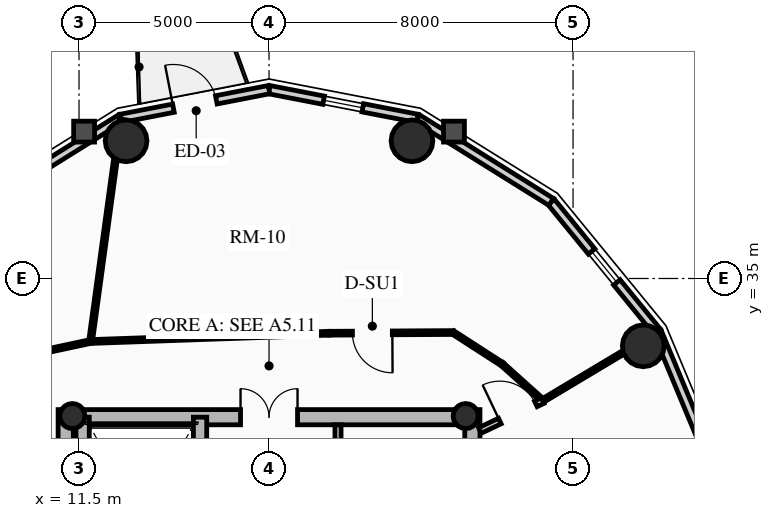
"""IFC4 building model, lengths in metres.
Left out: names, types, materials, properties, quantities, classifications, styles, units other than length and angle.
Written with IfcOpenShell. Run it as: python <this file> out.ifc"""

import sys

from ifc_helpers import new_model, si_unit, direction, frame, frame_2d, origin, origin_2d, place, context, subcontext, project, spatial, rectangle, circle, hollow_circle, extrude, source, transform, mapped, element, fill, save


model = new_model("IFC4")
c1 = context("Model", 3, precision=1e-05, world=origin(), true_north=direction((0.0, 1.0)))
c2 = subcontext(c1, "Body", "Model", "MODEL_VIEW")
j1 = project(units=[si_unit("LENGTHUNIT", "METRE"), si_unit("PLANEANGLEUNIT", "RADIAN")], contexts=[c1])
p1 = place(None, origin())
s1 = spatial("IfcSite", under=j1, at=p1, CompositionType="ELEMENT")
p2 = place(p1, origin())
s2 = spatial("IfcBuilding", under=s1, at=p2, CompositionType="ELEMENT")
p3 = place(p2, frame((0.0, 0.0, 199.57)))
s3 = spatial("IfcBuildingStorey", under=s2, at=p3, CompositionType="ELEMENT", Elevation=199.57)
for number, where, z_axis, x_axis in (
    (1, (11.15, 17.45, 0.0), (0.0, 0.0, 1.0), (0.0, 1.0, 0.0)),
    (2, (21.85, 17.45, 0.0), (0.0, 0.0, 1.0), (0.0, 1.0, 0.0)),
):
    element("IfcWall", number, at=place(p3, frame(where, z_axis=z_axis, x_axis=x_axis)), inside=s3, PredefinedType="SHEAR", context=c2, shape_type="SweptSolid", body=[
        extrude(rectangle(XDim=14.1, YDim=0.4, at=frame_2d((7.05, 0.0))), origin(), (0.0, 0.0, 1.0), 2.91),
    ])
p4 = place(p3, frame((11.15, 31.35, 0.0), z_axis=(0.0, 0.0, 1.0), x_axis=(1.0, 0.0, 0.0)))
e3 = element("IfcWall", 3, at=p4, inside=s3, PredefinedType="SHEAR", context=c2, shape_type="SweptSolid", body=[
    extrude(rectangle(XDim=10.7, YDim=0.4, at=frame_2d((5.35, 0.0))), origin(), (0.0, 0.0, 1.0), 2.91),
])
m1 = source(origin(), c2, "Body", "SweptSolid", [
    extrude(rectangle(XDim=1.5, YDim=2.02, at=frame_2d((0.75, 1.01))), frame((0.0, 0.21, 0.0), z_axis=(0.0, -1.0, 0.0), x_axis=(1.0, 0.0, 0.0)), (0.0, 0.0, 1.0), 0.42),
])
p5 = place(p4, frame((4.6, 0.0, 0.0)))
e4 = element("IfcOpeningElement", 4, at=p5, cuts=e3, PredefinedType="OPENING", context=c2, shape_type="MappedRepresentation", body=[
    mapped(m1, transform((0.0, 0.0, 0.0), x_axis=(1.0, 0.0, 0.0), y_axis=(0.0, 1.0, 0.0), z_axis=(0.0, 0.0, 1.0), scale=1.0)),
])
p6 = place(p3, frame((14.685, 17.65, 0.0), z_axis=(0.0, 0.0, 1.0), x_axis=(0.0, 1.0, 0.0)))
e5 = element("IfcWall", 5, at=p6, inside=s3, PredefinedType="SHEAR", context=c2, shape_type="SweptSolid", body=[
    extrude(rectangle(XDim=13.7, YDim=0.35, at=frame_2d((6.85, 0.0))), origin(), (0.0, 0.0, 1.0), 2.91),
])
m2 = source(origin(), c2, "Body", "SweptSolid", [
    extrude(rectangle(XDim=1.1, YDim=2.015, at=frame_2d((0.55, 1.007))), frame((0.0, 0.185, 0.0), z_axis=(0.0, -1.0, 0.0), x_axis=(1.0, 0.0, 0.0)), (0.0, 0.0, 1.0), 0.37),
])
p7 = place(p6, frame((4.85, 0.0, 0.0)))
e6 = element("IfcOpeningElement", 6, at=p7, cuts=e5, PredefinedType="OPENING", context=c2, shape_type="MappedRepresentation", body=[
    mapped(m2, transform((0.0, 0.0, 0.0), x_axis=(1.0, 0.0, 0.0), y_axis=(0.0, 1.0, 0.0), z_axis=(0.0, 0.0, 1.0), scale=1.0)),
])
p8 = place(p6, frame((0.625, 0.0, 0.0)))
e7 = element("IfcOpeningElement", 7, at=p8, cuts=e5, PredefinedType="OPENING", context=c2, shape_type="MappedRepresentation", body=[
    mapped(m2, transform((0.0, 0.0, 0.0), x_axis=(1.0, 0.0, 0.0), y_axis=(0.0, 1.0, 0.0), z_axis=(0.0, 0.0, 1.0), scale=1.0)),
])
p9 = place(p6, frame((2.625, 0.0, 0.0)))
e8 = element("IfcOpeningElement", 8, at=p9, cuts=e5, PredefinedType="OPENING", context=c2, shape_type="MappedRepresentation", body=[
    mapped(m2, transform((0.0, 0.0, 0.0), x_axis=(1.0, 0.0, 0.0), y_axis=(0.0, 1.0, 0.0), z_axis=(0.0, 0.0, 1.0), scale=1.0)),
])
m3 = source(origin(), c2, "Body", "SweptSolid", [
    extrude(rectangle(XDim=1.15, YDim=2.02, at=frame_2d((0.575, 1.01))), frame((0.0, 0.185, 0.0), z_axis=(0.0, -1.0, 0.0), x_axis=(1.0, 0.0, 0.0)), (0.0, 0.0, 1.0), 0.37),
])
p10 = place(p6, frame((7.27, 0.0, 0.0)))
e9 = element("IfcOpeningElement", 9, at=p10, cuts=e5, PredefinedType="OPENING", context=c2, shape_type="MappedRepresentation", body=[
    mapped(m3, transform((0.0, 0.0, 0.0), x_axis=(1.0, 0.0, 0.0), y_axis=(0.0, 1.0, 0.0), z_axis=(0.0, 0.0, 1.0), scale=1.0)),
])
p11 = place(p3, frame((11.595, 24.655, 0.0), z_axis=(0.0, 0.0, 1.0), x_axis=(0.0, 1.0, 0.0)))
e10 = element("IfcWall", 10, at=p11, inside=s3, PredefinedType="SHEAR", context=c2, shape_type="SweptSolid", body=[
    extrude(rectangle(XDim=6.695, YDim=0.35, at=frame_2d((3.348, 0.0))), origin(), (0.0, 0.0, 1.0), 2.91),
])
for number, where, z_axis, x_axis in (
    (11, (11.325, 31.38, 0.0), (0.0, 0.0, 1.0), (1.0, 0.0, 0.0)),
    (12, (21.675, 31.38, 0.0), (0.0, 0.0, 1.0), (1.0, 0.0, 0.0)),
):
    element("IfcColumn", number, at=place(p3, frame(where, z_axis=z_axis, x_axis=x_axis)), inside=s3, PredefinedType="COLUMN", context=c2, shape_type="SweptSolid", body=[
        extrude(hollow_circle(Radius=0.33, WallThickness=0.025, at=origin_2d()), origin(), (0.0, 0.0, 1.0), 2.91),
    ])
for number, where, z_axis, x_axis in (
    (13, (26.347, 33.229, 0.0), (0.0, 0.0, 1.0), (1.0, 0.0, 0.0)),
    (14, (20.261, 38.623, 0.0), (0.0, 0.0, 1.0), (1.0, 0.0, 0.0)),
    (15, (12.739, 38.623, 0.0), (0.0, 0.0, 1.0), (1.0, 0.0, 0.0)),
):
    element("IfcColumn", number, at=place(p3, frame(where, z_axis=z_axis, x_axis=x_axis)), inside=s3, PredefinedType="USERDEFINED", context=c2, shape_type="SweptSolid", body=[
        extrude(circle(Radius=0.55, at=origin_2d()), origin(), (0.0, 0.0, 1.0), 2.91),
    ])
p12 = place(p3, frame((26.718, 33.593, 0.0), z_axis=(0.0, 0.0, 1.0), x_axis=(0.384036305194, -0.923317993052, 0.0)))
e16 = element("IfcWall", 16, at=p12, inside=s3, PredefinedType="SOLIDWALL", context=c2, shape_type="SweptSolid", body=[
    extrude(rectangle(XDim=4.671, YDim=0.22, at=frame_2d((2.335, 0.0))), origin(), (0.0, 0.0, 1.0), 2.322),
])
p13 = place(p3, frame((23.924, 37.015, 0.0), z_axis=(0.0, 0.0, 1.0), x_axis=(0.632467166636, -0.774587169483, 0.0)))
e17 = element("IfcWall", 17, at=p13, inside=s3, PredefinedType="SOLIDWALL", context=c2, shape_type="SweptSolid", body=[
    extrude(rectangle(XDim=4.418, YDim=0.22, at=frame_2d((2.209, 0.0))), origin(), (0.0, 0.0, 1.0), 2.322),
])
m4 = source(origin(), c2, "Body", "SweptSolid", [
    extrude(rectangle(XDim=1.05, YDim=1.3, at=frame_2d((0.525, 0.65))), frame((0.0, 0.12, 0.0), z_axis=(0.0, -1.0, 0.0), x_axis=(1.0, 0.0, 0.0)), (0.0, 0.0, 1.0), 0.24),
])
p14 = place(p13, frame((1.684, 0.0, 0.65)))
e18 = element("IfcOpeningElement", 18, at=p14, cuts=e17, PredefinedType="OPENING", context=c2, shape_type="MappedRepresentation", body=[
    mapped(m4, transform((0.0, 0.0, 0.0), x_axis=(1.0, 0.0, 0.0), y_axis=(0.0, 1.0, 0.0), z_axis=(0.0, 0.0, 1.0), scale=1.0)),
])
p15 = place(p3, frame((20.403, 39.213, 0.0), z_axis=(0.0, 0.0, 1.0), x_axis=(0.848318713376, -0.529485939886, 0.0)))
e19 = element("IfcWall", 19, at=p15, inside=s3, PredefinedType="SOLIDWALL", context=c2, shape_type="SweptSolid", body=[
    extrude(rectangle(XDim=4.15, YDim=0.22, at=frame_2d((2.075, 0.0))), origin(), (0.0, 0.0, 1.0), 2.322),
])
p16 = place(p3, frame((16.5, 39.97, 0.0), z_axis=(0.0, 0.0, 1.0), x_axis=(0.981700307484, -0.190432419211, 0.0)))
e20 = element("IfcWall", 20, at=p16, inside=s3, PredefinedType="SOLIDWALL", context=c2, shape_type="SweptSolid", body=[
    extrude(rectangle(XDim=3.976, YDim=0.22, at=frame_2d((1.988, 0.0))), origin(), (0.0, 0.0, 1.0), 2.322),
])
p17 = place(p16, frame((1.463, 0.0, 0.65)))
e21 = element("IfcOpeningElement", 21, at=p17, cuts=e20, PredefinedType="OPENING", context=c2, shape_type="MappedRepresentation", body=[
    mapped(m4, transform((0.0, 0.0, 0.0), x_axis=(1.0, 0.0, 0.0), y_axis=(0.0, 1.0, 0.0), z_axis=(0.0, 0.0, 1.0), scale=1.0)),
])
p18 = place(p3, frame((12.597, 39.213, 0.0), z_axis=(0.0, 0.0, 1.0), x_axis=(0.981700307484, 0.190432419211, 0.0)))
e22 = element("IfcWall", 22, at=p18, inside=s3, PredefinedType="SOLIDWALL", context=c2, shape_type="SweptSolid", body=[
    extrude(rectangle(XDim=3.976, YDim=0.22, at=frame_2d((1.988, 0.0))), origin(), (0.0, 0.0, 1.0), 2.322),
])
m5 = source(origin(), c2, "Body", "SweptSolid", [
    extrude(rectangle(XDim=1.15, YDim=2.005, at=frame_2d((0.575, 1.002))), frame((0.0, 0.12, 0.0), z_axis=(0.0, -1.0, 0.0), x_axis=(1.0, 0.0, 0.0)), (0.0, 0.0, 1.0), 0.24),
])
p19 = place(p18, frame((1.413, 0.0, 0.0)))
e23 = element("IfcOpeningElement", 23, at=p19, cuts=e22, PredefinedType="OPENING", context=c2, shape_type="MappedRepresentation", body=[
    mapped(m5, transform((0.0, 0.0, 0.0), x_axis=(1.0, 0.0, 0.0), y_axis=(0.0, 1.0, 0.0), z_axis=(0.0, 0.0, 1.0), scale=1.0)),
])
p20 = place(p3, frame((9.076, 37.015, 0.0), z_axis=(0.0, 0.0, 1.0), x_axis=(0.848318713376, 0.529485939886, 0.0)))
e24 = element("IfcWall", 24, at=p20, inside=s3, PredefinedType="SOLIDWALL", context=c2, shape_type="SweptSolid", body=[
    extrude(rectangle(XDim=4.15, YDim=0.22, at=frame_2d((2.075, 0.0))), origin(), (0.0, 0.0, 1.0), 2.322),
])
p21 = place(p3, frame((18.315, 27.25, 0.0), z_axis=(0.0, 0.0, 1.0), x_axis=(0.0, 1.0, 0.0)))
e25 = element("IfcWall", 25, at=p21, inside=s3, PredefinedType="PARTITIONING", context=c2, shape_type="SweptSolid", body=[
    extrude(rectangle(XDim=3.9, YDim=0.16, at=frame_2d((1.95, 0.0))), origin(), (0.0, 0.0, 1.0), 2.685),
])
m6 = source(origin(), c2, "Body", "SweptSolid", [
    extrude(rectangle(XDim=0.9, YDim=2.005, at=frame_2d((0.45, 1.002))), frame((0.0, 0.09, 0.0), z_axis=(0.0, -1.0, 0.0), x_axis=(1.0, 0.0, 0.0)), (0.0, 0.0, 1.0), 0.18),
])
p22 = place(p21, frame((2.2, 0.0, 0.0)))
e26 = element("IfcOpeningElement", 26, at=p22, cuts=e25, PredefinedType="OPENING", context=c2, shape_type="MappedRepresentation", body=[
    mapped(m6, transform((0.0, 0.0, 0.0), x_axis=(1.0, 0.0, 0.0), y_axis=(0.0, 1.0, 0.0), z_axis=(0.0, 0.0, 1.0), scale=1.0)),
])
p23 = place(p3, frame((23.701, 31.786, 0.0), z_axis=(0.0, 0.0, 1.0), x_axis=(-0.743742806382, 0.668465883913, 0.0)))
e27 = element("IfcWall", 27, at=p23, inside=s3, PredefinedType="MOVABLE", context=c2, shape_type="SweptSolid", body=[
    extrude(rectangle(XDim=1.434, YDim=0.1, at=frame_2d((0.717, 0.0))), origin(), (0.0, 0.0, 1.0), 2.322),
])
p24 = place(p3, frame((22.635, 32.744, 0.0), z_axis=(0.0, 0.0, 1.0), x_axis=(-0.840119270642, 0.542401706391, 0.0)))
e28 = element("IfcWall", 28, at=p24, inside=s3, PredefinedType="MOVABLE", context=c2, shape_type="SweptSolid", body=[
    extrude(rectangle(XDim=1.538, YDim=0.1, at=frame_2d((0.769, 0.0))), origin(), (0.0, 0.0, 1.0), 2.255),
])
p25 = place(p3, frame((21.344, 33.578, 0.0), z_axis=(0.0, 0.0, 1.0), x_axis=(-0.999984243152, -0.005613684, 0.0)))
e29 = element("IfcWall", 29, at=p25, inside=s3, PredefinedType="MOVABLE", context=c2, shape_type="SweptSolid", body=[
    extrude(rectangle(XDim=3.262, YDim=0.1, at=frame_2d((1.631, 0.0))), origin(), (0.0, 0.0, 1.0), 2.322),
])
m7 = source(origin(), c2, "Body", "SweptSolid", [
    extrude(rectangle(XDim=1.05, YDim=2.015, at=frame_2d((0.525, 1.007))), frame((0.0, 0.06, 0.0), z_axis=(0.0, -1.0, 0.0), x_axis=(1.0, 0.0, 0.0)), (0.0, 0.0, 1.0), 0.12),
])
p26 = place(p25, frame((1.599, 0.0, 0.0)))
e30 = element("IfcOpeningElement", 30, at=p26, cuts=e29, PredefinedType="OPENING", context=c2, shape_type="MappedRepresentation", body=[
    mapped(m7, transform((0.0, 0.0, 0.0), x_axis=(1.0, 0.0, 0.0), y_axis=(0.0, 1.0, 0.0), z_axis=(0.0, 0.0, 1.0), scale=1.0)),
])
p27 = place(p3, frame((18.082, 33.56, 0.0), z_axis=(0.0, 0.0, 1.0), x_axis=(-0.999399009709, -0.034664382185, 0.0)))
e31 = element("IfcWall", 31, at=p27, inside=s3, PredefinedType="MOVABLE", context=c2, shape_type="SweptSolid", body=[
    extrude(rectangle(XDim=6.282, YDim=0.1, at=frame_2d((3.141, 0.0))), origin(), (0.0, 0.0, 1.0), 2.255),
])
p28 = place(p3, frame((11.803, 33.342, 0.0), z_axis=(0.0, 0.0, 1.0), x_axis=(-0.977750742783, -0.209770076483, 0.0)))
e32 = element("IfcWall", 32, at=p28, inside=s3, PredefinedType="MOVABLE", context=c2, shape_type="SweptSolid", body=[
    extrude(rectangle(XDim=1.868, YDim=0.1, at=frame_2d((0.934, 0.0))), origin(), (0.0, 0.0, 1.0), 2.255),
])
p29 = place(p3, frame((23.701, 31.786, 0.0), z_axis=(0.0, 0.0, 1.0), x_axis=(0.858059206709, 0.513550774298, 0.0)))
e33 = element("IfcWall", 33, at=p29, inside=s3, PredefinedType="MOVABLE", context=c2, shape_type="SweptSolid", body=[
    extrude(rectangle(XDim=3.497, YDim=0.1, at=frame_2d((1.748, 0.0))), origin(), (0.0, 0.0, 1.0), 2.322),
])
p30 = place(p3, frame((11.803, 33.342, 0.0), z_axis=(0.0, 0.0, 1.0), x_axis=(0.135452591041, 0.990783828885, 0.0)))
e34 = element("IfcWall", 34, at=p30, inside=s3, PredefinedType="MOVABLE", context=c2, shape_type="SweptSolid", body=[
    extrude(rectangle(XDim=5.906, YDim=0.1, at=frame_2d((2.953, 0.0))), origin(), (0.0, 0.0, 1.0), 2.322),
])
p31 = place(p3, frame((22.05, 31.0, 0.0), z_axis=(0.0, 0.0, 1.0), x_axis=(0.903013459407, 0.429612257891, 0.0)))
e35 = element("IfcWall", 35, at=p31, inside=s3, PredefinedType="PARTITIONING", context=c2, shape_type="SweptSolid", body=[
    extrude(rectangle(XDim=1.829, YDim=0.16, at=frame_2d((0.914, 0.0))), origin(), (0.0, 0.0, 1.0), 2.255),
])
m8 = source(origin(), c2, "Body", "SweptSolid", [
    extrude(rectangle(XDim=1.05, YDim=2.015, at=frame_2d((0.525, 1.007))), frame((0.0, 0.09, 0.0), z_axis=(0.0, -1.0, 0.0), x_axis=(1.0, 0.0, 0.0)), (0.0, 0.0, 1.0), 0.18),
])
p32 = place(p31, frame((0.579, 0.0, 0.0)))
e36 = element("IfcOpeningElement", 36, at=p32, cuts=e35, PredefinedType="OPENING", context=c2, shape_type="MappedRepresentation", body=[
    mapped(m8, transform((0.0, 0.0, 0.0), x_axis=(1.0, 0.0, 0.0), y_axis=(0.0, 1.0, 0.0), z_axis=(0.0, 0.0, 1.0), scale=1.0)),
])
m9 = source(origin(), c2, "Body", "SweptSolid", [
    extrude(rectangle(XDim=1.05, YDim=1.3, at=frame_2d((0.525, 0.65))), frame((0.0, 0.03, 0.0), z_axis=(0.0, -1.0, 0.0), x_axis=(1.0, 0.0, 0.0)), (0.0, 0.0, 1.0), 0.06),
])
p33 = place(p14, origin())
e37 = element("IfcWindow", 37, at=p33, inside=s3, PartitioningType="SINGLE_PANEL", PredefinedType="WINDOW", context=c2, shape_type="MappedRepresentation", body=[
    mapped(m9, transform((0.0, 0.0, 0.0), x_axis=(1.0, 0.0, 0.0), y_axis=(0.0, 1.0, 0.0), z_axis=(0.0, 0.0, 1.0), scale=1.0)),
])
fill(e18, e37)
p34 = place(p17, origin())
e38 = element("IfcWindow", 38, at=p34, inside=s3, PartitioningType="SINGLE_PANEL", PredefinedType="WINDOW", context=c2, shape_type="MappedRepresentation", body=[
    mapped(m9, transform((0.0, 0.0, 0.0), x_axis=(1.0, 0.0, 0.0), y_axis=(0.0, 1.0, 0.0), z_axis=(0.0, 0.0, 1.0), scale=1.0)),
])
fill(e21, e38)
m10 = source(origin(), c2, "Body", "SweptSolid", [
    extrude(rectangle(XDim=1.15, YDim=2.005, at=frame_2d((0.575, 1.002))), frame((0.0, 0.025, 0.0), z_axis=(0.0, -1.0, 0.0), x_axis=(1.0, 0.0, 0.0)), (0.0, 0.0, 1.0), 0.05),
])
p35 = place(p19, origin())
e39 = element("IfcDoor", 39, at=p35, inside=s3, OperationType="SINGLE_SWING_LEFT", PredefinedType="DOOR", context=c2, shape_type="MappedRepresentation", body=[
    mapped(m10, transform((0.0, 0.0, 0.0), x_axis=(1.0, 0.0, 0.0), y_axis=(0.0, 1.0, 0.0), z_axis=(0.0, 0.0, 1.0), scale=1.0)),
])
fill(e23, e39)
m11 = source(origin(), c2, "Body", "SweptSolid", [
    extrude(rectangle(XDim=1.5, YDim=2.02, at=frame_2d((0.75, 1.01))), frame((0.0, 0.025, 0.0), z_axis=(0.0, -1.0, 0.0), x_axis=(1.0, 0.0, 0.0)), (0.0, 0.0, 1.0), 0.05),
])
p36 = place(p5, origin())
e40 = element("IfcDoor", 40, at=p36, inside=s3, OperationType="DOUBLE_DOOR_SINGLE_SWING", PredefinedType="DOOR", context=c2, shape_type="MappedRepresentation", body=[
    mapped(m11, transform((0.0, 0.0, 0.0), x_axis=(1.0, 0.0, 0.0), y_axis=(0.0, 1.0, 0.0), z_axis=(0.0, 0.0, 1.0), scale=1.0)),
])
fill(e4, e40)
m12 = source(origin(), c2, "Body", "SweptSolid", [
    extrude(rectangle(XDim=1.05, YDim=2.015, at=frame_2d((0.525, 1.007))), frame((0.0, 0.025, 0.0), z_axis=(0.0, -1.0, 0.0), x_axis=(1.0, 0.0, 0.0)), (0.0, 0.0, 1.0), 0.05),
])
p37 = place(p32, origin())
e41 = element("IfcDoor", 41, at=p37, inside=s3, OperationType="SINGLE_SWING_LEFT", PredefinedType="DOOR", context=c2, shape_type="MappedRepresentation", body=[
    mapped(m12, transform((0.0, 0.0, 0.0), x_axis=(1.0, 0.0, 0.0), y_axis=(0.0, 1.0, 0.0), z_axis=(0.0, 0.0, 1.0), scale=1.0)),
])
fill(e36, e41)
p38 = place(p26, origin())
e42 = element("IfcDoor", 42, at=p38, inside=s3, OperationType="SINGLE_SWING_LEFT", PredefinedType="DOOR", context=c2, shape_type="MappedRepresentation", body=[
    mapped(m12, transform((0.0, 0.0, 0.0), x_axis=(1.0, 0.0, 0.0), y_axis=(0.0, 1.0, 0.0), z_axis=(0.0, 0.0, 1.0), scale=1.0)),
])
fill(e30, e42)
save(model, sys.argv[1])
